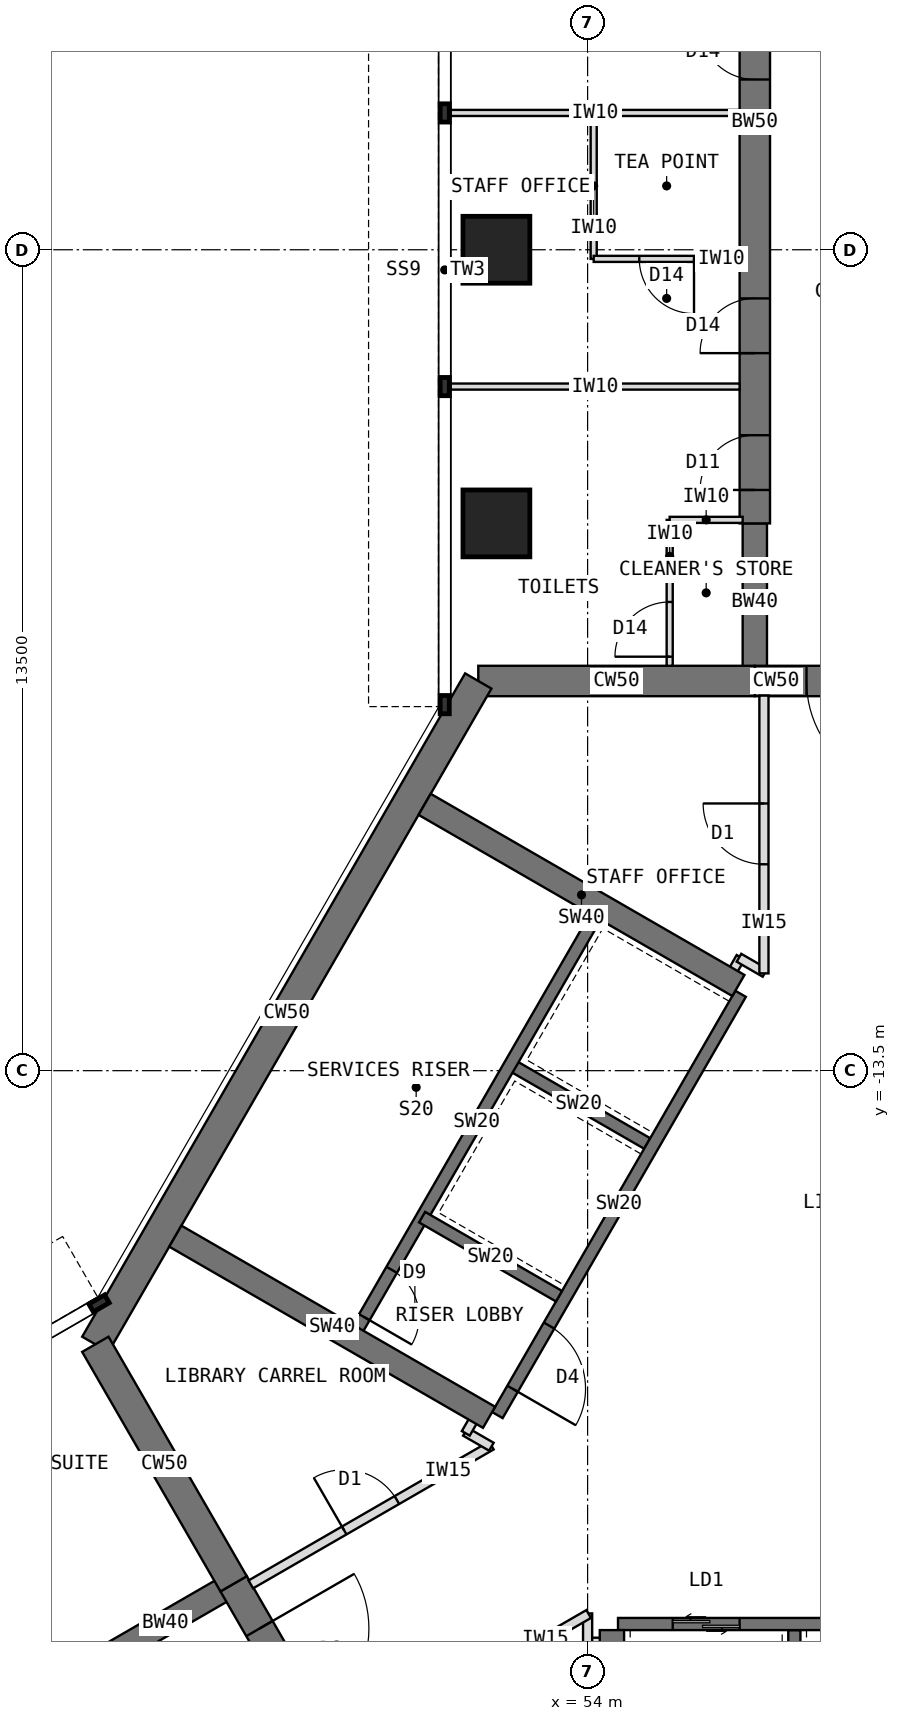
"""IFC4 building model, lengths in metres.
Left out: names, types, materials, properties, quantities, classifications, styles, units other than length and angle.
Written with IfcOpenShell. Run it as: python <this file> out.ifc"""

import sys

from ifc_helpers import new_model, si_unit, direction, frame, frame_2d, origin, origin_2d, place, context, subcontext, project, spatial, rectangle, extrude, element, fill, save


model = new_model("IFC4")
c1 = context("Model", 3, precision=1e-05, world=origin(), true_north=direction((0.0, 1.0)))
c2 = subcontext(c1, "Body", "Model", "MODEL_VIEW")
j1 = project(units=[si_unit("LENGTHUNIT", "METRE"), si_unit("PLANEANGLEUNIT", "RADIAN")], contexts=[c1])
p1 = place(None, origin())
s1 = spatial("IfcSite", under=j1, at=p1, CompositionType="ELEMENT")
p2 = place(p1, origin())
s2 = spatial("IfcBuilding", under=s1, at=p2, CompositionType="ELEMENT")
p3 = place(p2, frame((0.0, 0.0, 218.5)))
s3 = spatial("IfcBuildingStorey", under=s2, at=p3, CompositionType="ELEMENT", Elevation=218.5)
p4 = place(p3, frame((60.25, -7.092, 0.0), z_axis=(0.0, 0.0, 1.0), x_axis=(-1.0, 0.0, 0.0)))
e1 = element("IfcWall", 1, at=p4, inside=s3, PredefinedType="SHEAR", context=c2, shape_type="SweptSolid", body=[
    extrude(rectangle(XDim=3.5, YDim=0.5, at=frame_2d((1.75, 0.0))), origin(), (0.0, 0.0, 1.0), 4.0),
])
p5 = place(p4, frame((0.85, 0.0, 0.0)))
e2 = element("IfcOpeningElement", 2, at=p5, cuts=e1, PredefinedType="OPENING", context=c2, shape_type="SweptSolid", body=[
    extrude(rectangle(XDim=1.8, YDim=2.1, at=frame_2d((0.9, 1.05))), frame((0.0, 0.26, 0.0), z_axis=(0.0, -1.0, 0.0), x_axis=(1.0, 0.0, 0.0)), (0.0, 0.0, 1.0), 0.52),
])
p6 = place(p3, frame((56.75, -7.092, 0.0), z_axis=(0.0, 0.0, 1.0), x_axis=(-1.0, 0.0, 0.0)))
e3 = element("IfcWall", 3, at=p6, inside=s3, PredefinedType="SHEAR", context=c2, shape_type="SweptSolid", body=[
    extrude(rectangle(XDim=4.548, YDim=0.5, at=frame_2d((2.274, 0.0))), origin(), (0.0, 0.0, 1.0), 4.0),
])
p7 = place(p3, frame((52.202, -7.092, 0.0), z_axis=(0.0, 0.0, 1.0), x_axis=(-0.500005998175, -0.866021940709, 0.0)))
e4 = element("IfcWall", 4, at=p7, inside=s3, PredefinedType="SHEAR", context=c2, shape_type="SweptSolid", body=[
    extrude(rectangle(XDim=12.596, YDim=0.5, at=frame_2d((6.298, 0.0))), origin(), (0.0, 0.0, 1.0), 4.0),
])
p8 = place(p3, frame((45.904, -18.0, 0.0), z_axis=(0.0, 0.0, 1.0), x_axis=(0.500024481964, -0.866011268655, 0.0)))
e5 = element("IfcWall", 5, at=p8, inside=s3, PredefinedType="SHEAR", context=c2, shape_type="SweptSolid", body=[
    extrude(rectangle(XDim=4.548, YDim=0.5, at=frame_2d((2.274, 0.0))), origin(), (0.0, 0.0, 1.0), 4.0),
])
p9 = place(p3, frame((48.178, -21.939, 0.0), z_axis=(0.0, 0.0, 1.0), x_axis=(0.500010275428, -0.866019471182, 0.0)))
e6 = element("IfcWall", 6, at=p9, inside=s3, PredefinedType="SHEAR", context=c2, shape_type="SweptSolid", body=[
    extrude(rectangle(XDim=3.5, YDim=0.5, at=frame_2d((1.75, 0.0))), origin(), (0.0, 0.0, 1.0), 4.0),
])
p10 = place(p9, frame((0.85, 0.0, 0.0)))
e7 = element("IfcOpeningElement", 7, at=p10, cuts=e6, PredefinedType="OPENING", context=c2, shape_type="SweptSolid", body=[
    extrude(rectangle(XDim=1.8, YDim=2.1, at=frame_2d((0.9, 1.05))), frame((0.0, 0.26, 0.0), z_axis=(0.0, -1.0, 0.0), x_axis=(1.0, 0.0, 0.0)), (0.0, 0.0, 1.0), 0.52),
])
p11 = place(p3, frame((56.75, -7.092, 0.0), z_axis=(0.0, 0.0, 1.0), x_axis=(0.0, 1.0, 0.0)))
e8 = element("IfcWall", 8, at=p11, inside=s3, PredefinedType="SHEAR", context=c2, shape_type="SweptSolid", body=[
    extrude(rectangle(XDim=2.592, YDim=0.4, at=frame_2d((1.296, 0.0))), origin(), (0.0, 0.0, 1.0), 4.0),
])
p12 = place(p3, frame((56.75, -4.5, 0.0), z_axis=(0.0, 0.0, 1.0), x_axis=(0.0, 1.0, 0.0)))
e9 = element("IfcWall", 9, at=p12, inside=s3, PredefinedType="SHEAR", context=c2, shape_type="SweptSolid", body=[
    extrude(rectangle(XDim=13.2, YDim=0.5, at=frame_2d((6.6, 0.0))), origin(), (0.0, 0.0, 1.0), 4.0),
])
p13 = place(p12, frame((0.55, 0.0, 0.0)))
e10 = element("IfcOpeningElement", 10, at=p13, cuts=e9, PredefinedType="OPENING", context=c2, shape_type="SweptSolid", body=[
    extrude(rectangle(XDim=0.9, YDim=2.1, at=frame_2d((0.45, 1.05))), frame((0.0, 0.26, 0.0), z_axis=(0.0, -1.0, 0.0), x_axis=(1.0, 0.0, 0.0)), (0.0, 0.0, 1.0), 0.52),
])
p14 = place(p12, frame((2.8, 0.0, 0.0)))
e11 = element("IfcOpeningElement", 11, at=p14, cuts=e9, PredefinedType="OPENING", context=c2, shape_type="SweptSolid", body=[
    extrude(rectangle(XDim=0.9, YDim=2.1, at=frame_2d((0.45, 1.05))), frame((0.0, 0.26, 0.0), z_axis=(0.0, -1.0, 0.0), x_axis=(1.0, 0.0, 0.0)), (0.0, 0.0, 1.0), 0.52),
])
p15 = place(p12, frame((7.3, 0.0, 0.0)))
e12 = element("IfcOpeningElement", 12, at=p15, cuts=e9, PredefinedType="OPENING", context=c2, shape_type="SweptSolid", body=[
    extrude(rectangle(XDim=0.9, YDim=2.1, at=frame_2d((0.45, 1.05))), frame((0.0, 0.26, 0.0), z_axis=(0.0, -1.0, 0.0), x_axis=(1.0, 0.0, 0.0)), (0.0, 0.0, 1.0), 0.52),
])
p16 = place(p3, frame((48.178, -21.939, 0.0), z_axis=(0.0, 0.0, 1.0), x_axis=(-0.866072649678, -0.499918158782, 0.0)))
e13 = element("IfcWall", 13, at=p16, inside=s3, PredefinedType="SHEAR", context=c2, shape_type="SweptSolid", body=[
    extrude(rectangle(XDim=2.592, YDim=0.4, at=frame_2d((1.296, 0.0))), origin(), (0.0, 0.0, 1.0), 4.0),
])
for number, where, z_axis, x_axis in (
    (14, (52.5, -4.5, 0.0), (0.0, 0.0, 1.0), (1.0, 0.0, 0.0)),
    (15, (52.5, 0.0, 0.0), (0.0, 0.0, 1.0), (1.0, 0.0, 0.0)),
):
    element("IfcColumn", number, at=place(p3, frame(where, z_axis=z_axis, x_axis=x_axis)), inside=s3, PredefinedType="COLUMN", context=c2, shape_type="SweptSolid", body=[
        extrude(rectangle(XDim=1.1, YDim=1.1, at=origin_2d()), origin(), (0.0, 0.0, 1.0), 4.0),
    ])
p17 = place(p3, frame((56.516, -12.236, 0.0), z_axis=(0.0, 0.0, 1.0), x_axis=(-0.49999894854, -0.866026010844, 0.0)))
e16 = element("IfcWall", 16, at=p17, inside=s3, PredefinedType="SHEAR", context=c2, shape_type="SweptSolid", body=[
    extrude(rectangle(XDim=8.0, YDim=0.2, at=frame_2d((4.0, 0.0))), origin(), (0.0, 0.0, 1.0), 4.0),
])
p18 = place(p17, frame((6.3, 0.0, 0.0)))
e17 = element("IfcOpeningElement", 17, at=p18, cuts=e16, PredefinedType="OPENING", context=c2, shape_type="SweptSolid", body=[
    extrude(rectangle(XDim=1.2, YDim=2.1, at=frame_2d((0.6, 1.05))), frame((0.0, 0.11, 0.0), z_axis=(0.0, -1.0, 0.0), x_axis=(1.0, 0.0, 0.0)), (0.0, 0.0, 1.0), 0.22),
])
for number, where, z_axis, x_axis in (
    (18, (54.98, -14.697, 0.0), (0.0, 0.0, 1.0), (-0.866, 0.5, 0.0)),
    (19, (53.53, -17.209, 0.0), (0.0, 0.0, 1.0), (-0.866, 0.5, 0.0)),
):
    element("IfcWall", number, at=place(p3, frame(where, z_axis=z_axis, x_axis=x_axis)), inside=s3, PredefinedType="SHEAR", context=c2, shape_type="SweptSolid", body=[
        extrude(rectangle(XDim=2.6, YDim=0.2, at=frame_2d((1.3, 0.0))), origin(), (0.0, 0.0, 1.0), 4.0),
    ])
p19 = place(p3, frame((54.178, -10.886, 0.0), z_axis=(0.0, 0.0, 1.0), x_axis=(-0.49999894854, -0.866026010844, 0.0)))
e20 = element("IfcWall", 20, at=p19, inside=s3, PredefinedType="SHEAR", context=c2, shape_type="SweptSolid", body=[
    extrude(rectangle(XDim=8.0, YDim=0.2, at=frame_2d((4.0, 0.0))), origin(), (0.0, 0.0, 1.0), 4.0),
])
p20 = place(p19, frame((6.8, 0.0, 0.0)))
e21 = element("IfcOpeningElement", 21, at=p20, cuts=e20, PredefinedType="OPENING", context=c2, shape_type="SweptSolid", body=[
    extrude(rectangle(XDim=0.9, YDim=2.1, at=frame_2d((0.45, 1.05))), frame((0.0, 0.11, 0.0), z_axis=(0.0, -1.0, 0.0), x_axis=(1.0, 0.0, 0.0)), (0.0, 0.0, 1.0), 0.22),
])
p21 = place(p3, frame((52.38, -19.201, 0.0), z_axis=(0.0, 0.0, 1.0), x_axis=(-0.866012946976, 0.500021575205, 0.0)))
e22 = element("IfcWall", 22, at=p21, inside=s3, PredefinedType="SHEAR", context=c2, shape_type="SweptSolid", body=[
    extrude(rectangle(XDim=5.958, YDim=0.4, at=frame_2d((2.979, 0.0))), origin(), (0.0, 0.0, 1.0), 4.0),
])
p22 = place(p3, frame((56.48, -12.099, 0.0), z_axis=(0.0, 0.0, 1.0), x_axis=(-0.86602319114, 0.500003832394, 0.0)))
e23 = element("IfcWall", 23, at=p22, inside=s3, PredefinedType="SHEAR", context=c2, shape_type="SweptSolid", body=[
    extrude(rectangle(XDim=5.958, YDim=0.4, at=frame_2d((2.979, 0.0))), origin(), (0.0, 0.0, 1.0), 4.0),
])
p23 = place(p3, frame((54.5, -22.6, 0.0), z_axis=(0.0, 0.0, 1.0), x_axis=(1.0, 0.0, 0.0)))
e24 = element("IfcWall", 24, at=p23, inside=s3, PredefinedType="SHEAR", context=c2, shape_type="SweptSolid", body=[
    extrude(rectangle(XDim=8.0, YDim=0.2, at=frame_2d((4.0, 0.0))), origin(), (0.0, 0.0, 1.0), 4.0),
])
p24 = place(p23, frame((6.3, 0.0, 0.0)))
e25 = element("IfcOpeningElement", 25, at=p24, cuts=e24, PredefinedType="OPENING", context=c2, shape_type="SweptSolid", body=[
    extrude(rectangle(XDim=1.2, YDim=2.1, at=frame_2d((0.6, 1.05))), frame((0.0, 0.11, 0.0), z_axis=(0.0, -1.0, 0.0), x_axis=(1.0, 0.0, 0.0)), (0.0, 0.0, 1.0), 0.22),
])
p25 = place(p23, frame((0.9, 0.0, 0.0)))
e26 = element("IfcOpeningElement", 26, at=p25, cuts=e24, PredefinedType="OPENING", context=c2, shape_type="SweptSolid", body=[
    extrude(rectangle(XDim=1.1, YDim=2.2, at=frame_2d((0.55, 1.1))), frame((0.0, 0.11, 0.0), z_axis=(0.0, -1.0, 0.0), x_axis=(1.0, 0.0, 0.0)), (0.0, 0.0, 1.0), 0.22),
])
p26 = place(p3, frame((57.4, -22.7, 0.0), z_axis=(0.0, 0.0, 1.0), x_axis=(0.0, -1.0, 0.0)))
e27 = element("IfcWall", 27, at=p26, inside=s3, PredefinedType="SHEAR", context=c2, shape_type="SweptSolid", body=[
    extrude(rectangle(XDim=2.6, YDim=0.2, at=frame_2d((1.3, 0.0))), origin(), (0.0, 0.0, 1.0), 4.0),
])
p27 = place(p3, frame((54.4, -22.7, 0.0), z_axis=(0.0, 0.0, 1.0), x_axis=(0.0, -1.0, 0.0)))
e28 = element("IfcWall", 28, at=p27, inside=s3, PredefinedType="SHEAR", context=c2, shape_type="SweptSolid", body=[
    extrude(rectangle(XDim=5.958, YDim=0.4, at=frame_2d((2.979, 0.0))), origin(), (0.0, 0.0, 1.0), 4.0),
])
for number, where, z_axis, x_axis in (
    (29, (56.5, -2.25, 0.0), (0.0, 0.0, 1.0), (-1.0, 0.0, 0.0)),
    (30, (56.5, 2.25, 0.0), (0.0, 0.0, 1.0), (-1.0, 0.0, 0.0)),
):
    element("IfcWall", number, at=place(p3, frame(where, z_axis=z_axis, x_axis=x_axis)), inside=s3, PredefinedType="PARTITIONING", context=c2, shape_type="SweptSolid", body=[
        extrude(rectangle(XDim=4.75, YDim=0.1, at=frame_2d((2.375, 0.0))), origin(), (0.0, 0.0, 1.0), 3.8),
    ])
p28 = place(p3, frame((54.1, -0.15, 0.0), z_axis=(0.0, 0.0, 1.0), x_axis=(0.0, 1.0, 0.0)))
e31 = element("IfcWall", 31, at=p28, inside=s3, PredefinedType="PARTITIONING", context=c2, shape_type="SweptSolid", body=[
    extrude(rectangle(XDim=2.4, YDim=0.1, at=frame_2d((1.2, 0.0))), origin(), (0.0, 0.0, 1.0), 3.8),
])
p29 = place(p3, frame((56.5, -0.15, 0.0), z_axis=(0.0, 0.0, 1.0), x_axis=(-1.0, 0.0, 0.0)))
e32 = element("IfcWall", 32, at=p29, inside=s3, PredefinedType="PARTITIONING", context=c2, shape_type="SweptSolid", body=[
    extrude(rectangle(XDim=2.4, YDim=0.1, at=frame_2d((1.2, 0.0))), origin(), (0.0, 0.0, 1.0), 3.8),
])
p30 = place(p29, frame((0.75, 0.0, 0.0)))
e33 = element("IfcOpeningElement", 33, at=p30, cuts=e32, PredefinedType="OPENING", context=c2, shape_type="SweptSolid", body=[
    extrude(rectangle(XDim=0.9, YDim=2.1, at=frame_2d((0.45, 1.05))), frame((0.0, 0.06, 0.0), z_axis=(0.0, -1.0, 0.0), x_axis=(1.0, 0.0, 0.0)), (0.0, 0.0, 1.0), 0.12),
])
p31 = place(p3, frame((55.35, -6.842, 0.0), z_axis=(0.0, 0.0, 1.0), x_axis=(0.0, 1.0, 0.0)))
e34 = element("IfcWall", 34, at=p31, inside=s3, PredefinedType="PARTITIONING", context=c2, shape_type="SweptSolid", body=[
    extrude(rectangle(XDim=2.4, YDim=0.1, at=frame_2d((1.2, 0.0))), origin(), (0.0, 0.0, 1.0), 3.8),
])
p32 = place(p31, frame((0.15, 0.0, 0.0)))
e35 = element("IfcOpeningElement", 35, at=p32, cuts=e34, PredefinedType="OPENING", context=c2, shape_type="SweptSolid", body=[
    extrude(rectangle(XDim=0.9, YDim=2.1, at=frame_2d((0.45, 1.05))), frame((0.0, 0.06, 0.0), z_axis=(0.0, -1.0, 0.0), x_axis=(1.0, 0.0, 0.0)), (0.0, 0.0, 1.0), 0.12),
])
p33 = place(p3, frame((56.55, -4.442, 0.0), z_axis=(0.0, 0.0, 1.0), x_axis=(-1.0, 0.0, 0.0)))
e36 = element("IfcWall", 36, at=p33, inside=s3, PredefinedType="PARTITIONING", context=c2, shape_type="SweptSolid", body=[
    extrude(rectangle(XDim=1.2, YDim=0.1, at=frame_2d((0.6, 0.0))), origin(), (0.0, 0.0, 1.0), 3.267),
])
p34 = place(p3, frame((54.41, -22.9, 0.0), z_axis=(0.0, 0.0, 1.0), x_axis=(-1.0, 0.0, 0.0)))
e37 = element("IfcWall", 37, at=p34, inside=s3, PredefinedType="PARTITIONING", context=c2, shape_type="SweptSolid", body=[
    extrude(rectangle(XDim=0.43, YDim=0.15, at=frame_2d((0.215, 0.0))), origin(), (0.0, 0.0, 1.0), 3.8),
])
p35 = place(p3, frame((54.0, -22.92, 0.0), z_axis=(0.0, 0.0, 1.0), x_axis=(0.0, 1.0, 0.0)))
e38 = element("IfcWall", 38, at=p35, inside=s3, PredefinedType="PARTITIONING", context=c2, shape_type="SweptSolid", body=[
    extrude(rectangle(XDim=0.494, YDim=0.15, at=frame_2d((0.247, 0.0))), origin(), (0.0, 0.0, 1.0), 3.8),
])
p36 = place(p3, frame((54.017, -22.436, 0.0), z_axis=(0.0, 0.0, 1.0), x_axis=(-0.866024503882, -0.500001558674, 0.0)))
e39 = element("IfcWall", 39, at=p36, inside=s3, PredefinedType="PARTITIONING", context=c2, shape_type="SweptSolid", body=[
    extrude(rectangle(XDim=4.568, YDim=0.15, at=frame_2d((2.284, 0.0))), origin(), (0.0, 0.0, 1.0), 3.8),
])
p37 = place(p36, frame((1.794, 0.0, 0.0)))
e40 = element("IfcOpeningElement", 40, at=p37, cuts=e39, PredefinedType="OPENING", context=c2, shape_type="SweptSolid", body=[
    extrude(rectangle(XDim=1.0, YDim=2.1, at=frame_2d((0.5, 1.05))), frame((0.0, 0.085, 0.0), z_axis=(0.0, -1.0, 0.0), x_axis=(1.0, 0.0, 0.0)), (0.0, 0.0, 1.0), 0.17),
])
p38 = place(p3, frame((48.461, -21.948, 0.0), z_axis=(0.0, 0.0, 1.0), x_axis=(0.866024503882, 0.500001558674, 0.0)))
e41 = element("IfcWall", 41, at=p38, inside=s3, PredefinedType="PARTITIONING", context=c2, shape_type="SweptSolid", body=[
    extrude(rectangle(XDim=4.568, YDim=0.15, at=frame_2d((2.284, 0.0))), origin(), (0.0, 0.0, 1.0), 3.8),
])
p39 = place(p38, frame((1.774, 0.0, 0.0)))
e42 = element("IfcOpeningElement", 42, at=p39, cuts=e41, PredefinedType="OPENING", context=c2, shape_type="SweptSolid", body=[
    extrude(rectangle(XDim=1.0, YDim=2.1, at=frame_2d((0.5, 1.05))), frame((0.0, 0.085, 0.0), z_axis=(0.0, -1.0, 0.0), x_axis=(1.0, 0.0, 0.0)), (0.0, 0.0, 1.0), 0.17),
])
p40 = place(p3, frame((52.417, -19.684, 0.0), z_axis=(0.0, 0.0, 1.0), x_axis=(-0.865831790172, 0.50033519877, 0.0)))
e43 = element("IfcWall", 43, at=p40, inside=s3, PredefinedType="PARTITIONING", context=c2, shape_type="SweptSolid", body=[
    extrude(rectangle(XDim=0.494, YDim=0.15, at=frame_2d((0.247, 0.0))), origin(), (0.0, 0.0, 1.0), 3.8),
])
for number, where, z_axis, x_axis in (
    (44, (51.997, -19.464, 0.0), (0.0, 0.0, 1.0), (0.5, 0.866, 0.0)),
    (45, (56.302, -12.008, 0.0), (0.0, 0.0, 1.0), (0.5, 0.866, 0.0)),
):
    element("IfcWall", number, at=place(p3, frame(where, z_axis=z_axis, x_axis=x_axis)), inside=s3, PredefinedType="PARTITIONING", context=c2, shape_type="SweptSolid", body=[
        extrude(rectangle(XDim=0.43, YDim=0.15, at=frame_2d((0.215, 0.0))), origin(), (0.0, 0.0, 1.0), 3.8),
    ])
p41 = place(p3, frame((56.489, -11.643, 0.0), z_axis=(0.0, 0.0, 1.0), x_axis=(0.865831790172, -0.50033519877, 0.0)))
e46 = element("IfcWall", 46, at=p41, inside=s3, PredefinedType="PARTITIONING", context=c2, shape_type="SweptSolid", body=[
    extrude(rectangle(XDim=0.494, YDim=0.15, at=frame_2d((0.247, 0.0))), origin(), (0.0, 0.0, 1.0), 3.8),
])
p42 = place(p3, frame((56.9, -11.9, 0.0), z_axis=(0.0, 0.0, 1.0), x_axis=(0.0, 1.0, 0.0)))
e47 = element("IfcWall", 47, at=p42, inside=s3, PredefinedType="PARTITIONING", context=c2, shape_type="SweptSolid", body=[
    extrude(rectangle(XDim=4.568, YDim=0.15, at=frame_2d((2.284, 0.0))), origin(), (0.0, 0.0, 1.0), 3.8),
])
p43 = place(p42, frame((1.794, 0.0, 0.0)))
e48 = element("IfcOpeningElement", 48, at=p43, cuts=e47, PredefinedType="OPENING", context=c2, shape_type="SweptSolid", body=[
    extrude(rectangle(XDim=1.0, YDim=2.1, at=frame_2d((0.5, 1.05))), frame((0.0, 0.085, 0.0), z_axis=(0.0, -1.0, 0.0), x_axis=(1.0, 0.0, 0.0)), (0.0, 0.0, 1.0), 0.17),
])
p44 = place(p18, origin())
e49 = element("IfcDoor", 49, at=p44, inside=s3, OperationType="SINGLE_SWING_RIGHT", PredefinedType="DOOR", context=c2, shape_type="SweptSolid", body=[
    extrude(rectangle(XDim=1.2, YDim=2.1, at=frame_2d((0.6, 1.05))), frame((0.0, 0.025, 0.0), z_axis=(0.0, -1.0, 0.0), x_axis=(1.0, 0.0, 0.0)), (0.0, 0.0, 1.0), 0.05),
])
fill(e17, e49)
p45 = place(p20, origin())
e50 = element("IfcDoor", 50, at=p45, inside=s3, OperationType="SINGLE_SWING_RIGHT", PredefinedType="DOOR", context=c2, shape_type="SweptSolid", body=[
    extrude(rectangle(XDim=0.9, YDim=2.1, at=frame_2d((0.45, 1.05))), frame((0.0, 0.025, 0.0), z_axis=(0.0, -1.0, 0.0), x_axis=(1.0, 0.0, 0.0)), (0.0, 0.0, 1.0), 0.05),
])
fill(e21, e50)
p46 = place(p25, origin())
e51 = element("IfcDoor", 51, at=p46, inside=s3, OperationType="DOUBLE_DOOR_SLIDING", PredefinedType="DOOR", context=c2, shape_type="SweptSolid", body=[
    extrude(rectangle(XDim=1.1, YDim=2.2, at=frame_2d((0.55, 1.1))), frame((0.0, 0.025, 0.0), z_axis=(0.0, -1.0, 0.0), x_axis=(1.0, 0.0, 0.0)), (0.0, 0.0, 1.0), 0.05),
])
fill(e26, e51)
p47 = place(p5, origin())
e52 = element("IfcDoor", 52, at=p47, inside=s3, OperationType="DOUBLE_DOOR_DOUBLE_SWING", PredefinedType="DOOR", context=c2, shape_type="SweptSolid", body=[
    extrude(rectangle(XDim=1.8, YDim=2.1, at=frame_2d((0.9, 1.05))), frame((0.0, 0.025, 0.0), z_axis=(0.0, -1.0, 0.0), x_axis=(1.0, 0.0, 0.0)), (0.0, 0.0, 1.0), 0.05),
])
fill(e2, e52)
p48 = place(p10, origin())
e53 = element("IfcDoor", 53, at=p48, inside=s3, OperationType="DOUBLE_DOOR_DOUBLE_SWING", PredefinedType="DOOR", context=c2, shape_type="SweptSolid", body=[
    extrude(rectangle(XDim=1.8, YDim=2.1, at=frame_2d((0.9, 1.05))), frame((0.0, 0.025, 0.0), z_axis=(0.0, -1.0, 0.0), x_axis=(1.0, 0.0, 0.0)), (0.0, 0.0, 1.0), 0.05),
])
fill(e7, e53)
p49 = place(p30, origin())
e54 = element("IfcDoor", 54, at=p49, inside=s3, OperationType="SINGLE_SWING_LEFT", PredefinedType="DOOR", context=c2, shape_type="SweptSolid", body=[
    extrude(rectangle(XDim=0.9, YDim=2.1, at=frame_2d((0.45, 1.05))), frame((0.0, 0.025, 0.0), z_axis=(0.0, -1.0, 0.0), x_axis=(1.0, 0.0, 0.0)), (0.0, 0.0, 1.0), 0.05),
])
fill(e33, e54)
p50 = place(p32, origin())
e55 = element("IfcDoor", 55, at=p50, inside=s3, OperationType="SINGLE_SWING_LEFT", PredefinedType="DOOR", context=c2, shape_type="SweptSolid", body=[
    extrude(rectangle(XDim=0.9, YDim=2.1, at=frame_2d((0.45, 1.05))), frame((0.0, 0.025, 0.0), z_axis=(0.0, -1.0, 0.0), x_axis=(1.0, 0.0, 0.0)), (0.0, 0.0, 1.0), 0.05),
])
fill(e35, e55)
p51 = place(p39, origin())
e56 = element("IfcDoor", 56, at=p51, inside=s3, OperationType="SINGLE_SWING_LEFT", PredefinedType="DOOR", context=c2, shape_type="SweptSolid", body=[
    extrude(rectangle(XDim=1.0, YDim=2.1, at=frame_2d((0.5, 1.05))), frame((0.0, 0.025, 0.0), z_axis=(0.0, -1.0, 0.0), x_axis=(1.0, 0.0, 0.0)), (0.0, 0.0, 1.0), 0.05),
])
fill(e42, e56)
p52 = place(p43, origin())
e57 = element("IfcDoor", 57, at=p52, inside=s3, OperationType="SINGLE_SWING_RIGHT", PredefinedType="DOOR", context=c2, shape_type="SweptSolid", body=[
    extrude(rectangle(XDim=1.0, YDim=2.1, at=frame_2d((0.5, 1.05))), frame((0.0, 0.025, 0.0), z_axis=(0.0, -1.0, 0.0), x_axis=(1.0, 0.0, 0.0)), (0.0, 0.0, 1.0), 0.05),
])
fill(e48, e57)
p53 = place(p13, origin())
e58 = element("IfcDoor", 58, at=p53, inside=s3, OperationType="SINGLE_SWING_LEFT", PredefinedType="DOOR", context=c2, shape_type="SweptSolid", body=[
    extrude(rectangle(XDim=0.9, YDim=2.1, at=frame_2d((0.45, 1.05))), frame((0.0, 0.025, 0.0), z_axis=(0.0, -1.0, 0.0), x_axis=(1.0, 0.0, 0.0)), (0.0, 0.0, 1.0), 0.05),
])
fill(e10, e58)
p54 = place(p14, origin())
e59 = element("IfcDoor", 59, at=p54, inside=s3, OperationType="SINGLE_SWING_LEFT", PredefinedType="DOOR", context=c2, shape_type="SweptSolid", body=[
    extrude(rectangle(XDim=0.9, YDim=2.1, at=frame_2d((0.45, 1.05))), frame((0.0, 0.025, 0.0), z_axis=(0.0, -1.0, 0.0), x_axis=(1.0, 0.0, 0.0)), (0.0, 0.0, 1.0), 0.05),
])
fill(e11, e59)
p55 = place(p15, origin())
e60 = element("IfcDoor", 60, at=p55, inside=s3, OperationType="SINGLE_SWING_RIGHT", PredefinedType="DOOR", context=c2, shape_type="SweptSolid", body=[
    extrude(rectangle(XDim=0.9, YDim=2.1, at=frame_2d((0.45, 1.05))), frame((0.0, 0.025, 0.0), z_axis=(0.0, -1.0, 0.0), x_axis=(1.0, 0.0, 0.0)), (0.0, 0.0, 1.0), 0.05),
])
fill(e12, e60)
save(model, sys.argv[1])
